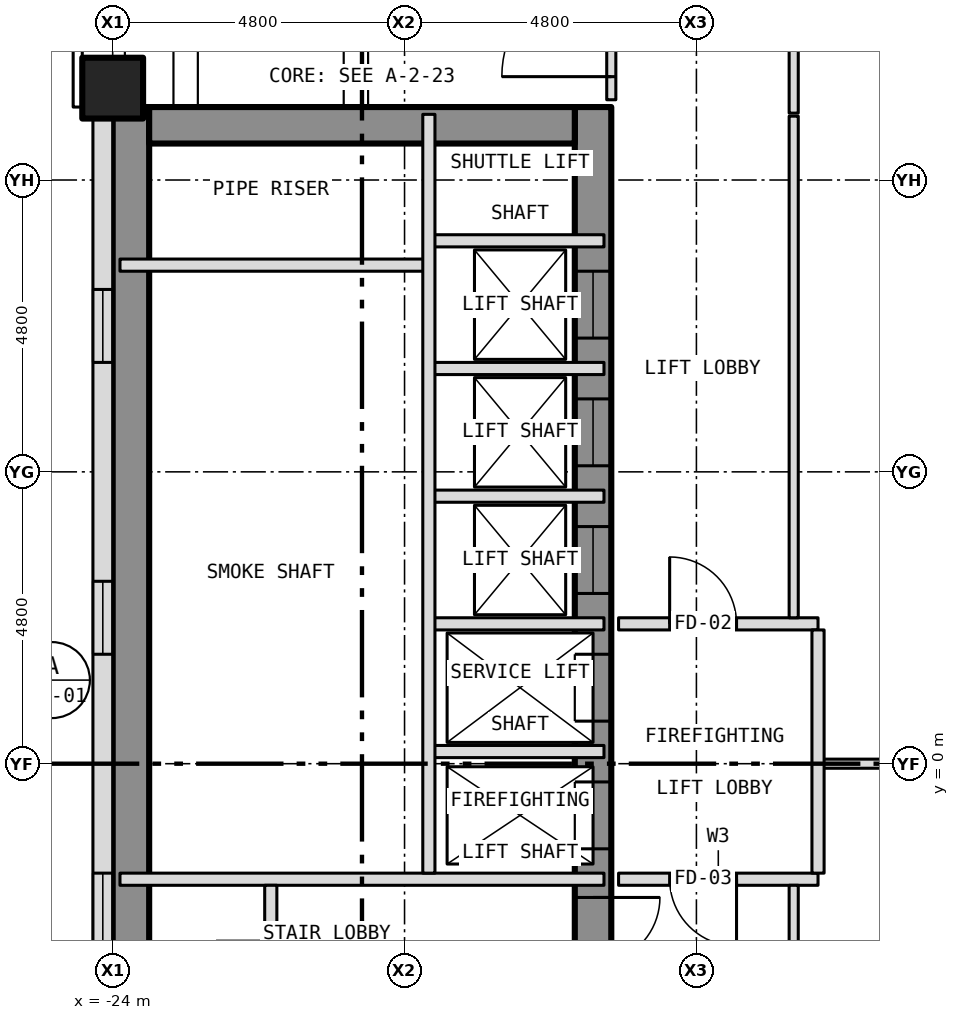
"""IFC4 building model, lengths in metres.
Left out: names, types, materials, properties, quantities, classifications, styles, units other than length and angle.
Written with IfcOpenShell. Run it as: python <this file> out.ifc"""

import sys

from ifc_helpers import new_model, si_unit, direction, frame, frame_2d, origin, origin_2d, place, context, subcontext, project, spatial, rectangle, hollow_rectangle, extrude, element, fill, save


model = new_model("IFC4")
c1 = context("Model", 3, precision=1e-05, world=origin(), true_north=direction((0.0, 1.0)))
c2 = subcontext(c1, "Body", "Model", "MODEL_VIEW")
j1 = project(units=[si_unit("LENGTHUNIT", "METRE"), si_unit("PLANEANGLEUNIT", "RADIAN")], contexts=[c1])
p1 = place(None, origin())
s1 = spatial("IfcSite", under=j1, at=p1, CompositionType="ELEMENT")
p2 = place(p1, origin())
s2 = spatial("IfcBuilding", under=s1, at=p2, CompositionType="ELEMENT")
p3 = place(p2, frame((0.0, 0.0, 84.5)))
s3 = spatial("IfcBuildingStorey", under=s2, at=p3, CompositionType="ELEMENT", Elevation=84.5)
p4 = place(p3, frame((-24.0, 11.111, -0.3), z_axis=(0.0, 0.0, 1.0), x_axis=(1.0, 0.0, 0.0)))
e1 = element("IfcColumn", 1, at=p4, inside=s3, PredefinedType="COLUMN", context=c2, shape_type="SweptSolid", body=[
    extrude(hollow_rectangle(XDim=1.0, YDim=1.0, WallThickness=0.06, at=origin_2d()), origin(), (0.0, 0.0, 1.0), 4.65),
])
p5 = place(p3, frame((-16.1, -10.8, 0.0), z_axis=(0.0, 0.0, 1.0), x_axis=(0.0, 1.0, 0.0)))
e2 = element("IfcWall", 2, at=p5, inside=s3, PredefinedType="SHEAR", context=c2, shape_type="SweptSolid", body=[
    extrude(rectangle(XDim=21.6, YDim=0.6, at=frame_2d((10.8, 0.0))), origin(), (0.0, 0.0, 1.0), 3.9),
])
p6 = place(p5, frame((9.4, 0.0, 0.0)))
e3 = element("IfcOpeningElement", 3, at=p6, cuts=e2, PredefinedType="OPENING", context=c2, shape_type="SweptSolid", body=[
    extrude(rectangle(XDim=1.1, YDim=2.1, at=frame_2d((0.55, 1.05))), frame((0.0, 0.312, 0.0), z_axis=(0.0, -1.0, 0.0), x_axis=(1.0, 0.0, 0.0)), (0.0, 0.0, 1.0), 0.624),
])
p7 = place(p5, frame((11.5, 0.0, 0.0)))
e4 = element("IfcOpeningElement", 4, at=p7, cuts=e2, PredefinedType="OPENING", context=c2, shape_type="SweptSolid", body=[
    extrude(rectangle(XDim=1.1, YDim=2.1, at=frame_2d((0.55, 1.05))), frame((0.0, 0.312, 0.0), z_axis=(0.0, -1.0, 0.0), x_axis=(1.0, 0.0, 0.0)), (0.0, 0.0, 1.0), 0.624),
])
p8 = place(p5, frame((13.6, 0.0, 0.0)))
e5 = element("IfcOpeningElement", 5, at=p8, cuts=e2, PredefinedType="OPENING", context=c2, shape_type="SweptSolid", body=[
    extrude(rectangle(XDim=1.1, YDim=2.1, at=frame_2d((0.55, 1.05))), frame((0.0, 0.312, 0.0), z_axis=(0.0, -1.0, 0.0), x_axis=(1.0, 0.0, 0.0)), (0.0, 0.0, 1.0), 0.624),
])
p9 = place(p5, frame((15.7, 0.0, 0.0)))
e6 = element("IfcOpeningElement", 6, at=p9, cuts=e2, PredefinedType="OPENING", context=c2, shape_type="SweptSolid", body=[
    extrude(rectangle(XDim=1.1, YDim=2.1, at=frame_2d((0.55, 1.05))), frame((0.0, 0.312, 0.0), z_axis=(0.0, -1.0, 0.0), x_axis=(1.0, 0.0, 0.0)), (0.0, 0.0, 1.0), 0.624),
])
p10 = place(p5, frame((17.8, 0.0, 0.0)))
e7 = element("IfcOpeningElement", 7, at=p10, cuts=e2, PredefinedType="OPENING", context=c2, shape_type="SweptSolid", body=[
    extrude(rectangle(XDim=1.1, YDim=2.1, at=frame_2d((0.55, 1.05))), frame((0.0, 0.312, 0.0), z_axis=(0.0, -1.0, 0.0), x_axis=(1.0, 0.0, 0.0)), (0.0, 0.0, 1.0), 0.624),
])
p11 = place(p5, frame((0.758, 0.0, 0.0)))
e8 = element("IfcOpeningElement", 8, at=p11, cuts=e2, PredefinedType="OPENING", context=c2, shape_type="SweptSolid", body=[
    extrude(rectangle(XDim=1.1, YDim=2.1, at=frame_2d((0.55, 1.05))), frame((0.0, 0.312, 0.0), z_axis=(0.0, -1.0, 0.0), x_axis=(1.0, 0.0, 0.0)), (0.0, 0.0, 1.0), 0.624),
])
p12 = place(p5, frame((7.5, 0.0, 0.0)))
e9 = element("IfcOpeningElement", 9, at=p12, cuts=e2, PredefinedType="OPENING", context=c2, shape_type="SweptSolid", body=[
    extrude(rectangle(XDim=1.1, YDim=2.1, at=frame_2d((0.55, 1.05))), frame((0.0, 0.312, 0.0), z_axis=(0.0, -1.0, 0.0), x_axis=(1.0, 0.0, 0.0)), (0.0, 0.0, 1.0), 0.624),
])
p13 = place(p3, frame((-23.7, -10.8, 0.0), z_axis=(0.0, 0.0, 1.0), x_axis=(0.0, 1.0, 0.0)))
e10 = element("IfcWall", 10, at=p13, inside=s3, PredefinedType="SHEAR", context=c2, shape_type="SweptSolid", body=[
    extrude(rectangle(XDim=21.6, YDim=0.6, at=frame_2d((10.8, 0.0))), origin(), (0.0, 0.0, 1.0), 3.9),
])
p14 = place(p3, frame((-23.4, 10.5, 0.0), z_axis=(0.0, 0.0, 1.0), x_axis=(1.0, 0.0, 0.0)))
e11 = element("IfcWall", 11, at=p14, inside=s3, PredefinedType="SHEAR", context=c2, shape_type="SweptSolid", body=[
    extrude(rectangle(XDim=7.0, YDim=0.6, at=frame_2d((3.5, 0.0))), origin(), (0.0, 0.0, 1.0), 3.9),
])
p15 = place(p3, frame((-24.163, 10.8, 0.0), z_axis=(0.0, 0.0, 1.0), x_axis=(0.0, -1.0, 0.0)))
e12 = element("IfcWall", 12, at=p15, inside=s3, PredefinedType="SOLIDWALL", context=c2, shape_type="SweptSolid", body=[
    extrude(rectangle(XDim=21.6, YDim=0.325, at=frame_2d((10.8, 0.0))), origin(), (0.0, 0.0, 1.0), 4.5),
])
p16 = place(p15, frame((3.0, 0.0, 2.2)))
e13 = element("IfcOpeningElement", 13, at=p16, cuts=e12, PredefinedType="OPENING", context=c2, shape_type="SweptSolid", body=[
    extrude(rectangle(XDim=1.2, YDim=0.6, at=frame_2d((0.6, 0.3))), frame((0.0, 0.175, 0.0), z_axis=(0.0, -1.0, 0.0), x_axis=(1.0, 0.0, 0.0)), (0.0, 0.0, 1.0), 0.349),
])
p17 = place(p15, frame((7.8, 0.0, 2.2)))
e14 = element("IfcOpeningElement", 14, at=p17, cuts=e12, PredefinedType="OPENING", context=c2, shape_type="SweptSolid", body=[
    extrude(rectangle(XDim=1.2, YDim=0.6, at=frame_2d((0.6, 0.3))), frame((0.0, 0.175, 0.0), z_axis=(0.0, -1.0, 0.0), x_axis=(1.0, 0.0, 0.0)), (0.0, 0.0, 1.0), 0.349),
])
p18 = place(p15, frame((12.6, 0.0, 2.2)))
e15 = element("IfcOpeningElement", 15, at=p18, cuts=e12, PredefinedType="OPENING", context=c2, shape_type="SweptSolid", body=[
    extrude(rectangle(XDim=1.2, YDim=0.6, at=frame_2d((0.6, 0.3))), frame((0.0, 0.175, 0.0), z_axis=(0.0, -1.0, 0.0), x_axis=(1.0, 0.0, 0.0)), (0.0, 0.0, 1.0), 0.349),
])
p19 = place(p15, frame((17.4, 0.0, 2.2)))
e16 = element("IfcOpeningElement", 16, at=p19, cuts=e12, PredefinedType="OPENING", context=c2, shape_type="SweptSolid", body=[
    extrude(rectangle(XDim=1.2, YDim=0.6, at=frame_2d((0.6, 0.3))), frame((0.0, 0.175, 0.0), z_axis=(0.0, -1.0, 0.0), x_axis=(1.0, 0.0, 0.0)), (0.0, 0.0, 1.0), 0.349),
])
p20 = place(p3, frame((-23.88, -1.9, 0.0), z_axis=(0.0, 0.0, 1.0), x_axis=(1.0, 0.0, 0.0)))
e17 = element("IfcWall", 17, at=p20, inside=s3, PredefinedType="PARTITIONING", context=c2, shape_type="SweptSolid", body=[
    extrude(rectangle(XDim=7.96, YDim=0.2, at=frame_2d((3.98, 0.0))), origin(), (0.0, 0.0, 1.0), 3.9),
])
p21 = place(p3, frame((-15.68, -1.9, 0.0), z_axis=(0.0, 0.0, 1.0), x_axis=(1.0, 0.0, 0.0)))
e18 = element("IfcWall", 18, at=p21, inside=s3, PredefinedType="PARTITIONING", context=c2, shape_type="SweptSolid", body=[
    extrude(rectangle(XDim=3.28, YDim=0.2, at=frame_2d((1.64, 0.0))), origin(), (0.0, 0.0, 1.0), 4.35),
])
p22 = place(p21, frame((0.84, 0.0, 0.0)))
e19 = element("IfcOpeningElement", 19, at=p22, cuts=e18, PredefinedType="OPENING", context=c2, shape_type="SweptSolid", body=[
    extrude(rectangle(XDim=1.1, YDim=2.1, at=frame_2d((0.55, 1.05))), frame((0.0, 0.112, 0.0), z_axis=(0.0, -1.0, 0.0), x_axis=(1.0, 0.0, 0.0)), (0.0, 0.0, 1.0), 0.224),
])
p23 = place(p3, frame((-12.4, 0.0, 0.0), z_axis=(0.0, 0.0, 1.0), x_axis=(1.0, 0.0, 0.0)))
e20 = element("IfcWall", 20, at=p23, inside=s3, PredefinedType="PARTITIONING", context=c2, shape_type="SweptSolid", body=[
    extrude(rectangle(XDim=2.596, YDim=0.15, at=frame_2d((1.298, 0.0))), origin(), (0.0, 0.0, 1.0), 3.728),
])
for number, where, z_axis, x_axis in (
    (21, (-18.8, 0.2, 0.0), (0.0, 0.0, 1.0), (1.0, 0.0, 0.0)),
    (22, (-18.8, 2.3, 0.0), (0.0, 0.0, 1.0), (1.0, 0.0, 0.0)),
):
    element("IfcWall", number, at=place(p3, frame(where, z_axis=z_axis, x_axis=x_axis)), inside=s3, PredefinedType="PARTITIONING", context=c2, shape_type="SweptSolid", body=[
        extrude(rectangle(XDim=2.88, YDim=0.2, at=frame_2d((1.44, 0.0))), origin(), (0.0, 0.0, 1.0), 3.9),
    ])
p24 = place(p3, frame((-15.68, 2.3, 0.0), z_axis=(0.0, 0.0, 1.0), x_axis=(1.0, 0.0, 0.0)))
e23 = element("IfcWall", 23, at=p24, inside=s3, PredefinedType="PARTITIONING", context=c2, shape_type="SweptSolid", body=[
    extrude(rectangle(XDim=3.28, YDim=0.2, at=frame_2d((1.64, 0.0))), origin(), (0.0, 0.0, 1.0), 4.35),
])
p25 = place(p24, frame((0.84, 0.0, 0.0)))
e24 = element("IfcOpeningElement", 24, at=p25, cuts=e23, PredefinedType="OPENING", context=c2, shape_type="SweptSolid", body=[
    extrude(rectangle(XDim=1.1, YDim=2.1, at=frame_2d((0.55, 1.05))), frame((0.0, 0.112, 0.0), z_axis=(0.0, -1.0, 0.0), x_axis=(1.0, 0.0, 0.0)), (0.0, 0.0, 1.0), 0.224),
])
for number, where, z_axis, x_axis in (
    (25, (-18.8, 4.4, 0.0), (0.0, 0.0, 1.0), (1.0, 0.0, 0.0)),
    (26, (-18.8, 6.5, 0.0), (0.0, 0.0, 1.0), (1.0, 0.0, 0.0)),
):
    element("IfcWall", number, at=place(p3, frame(where, z_axis=z_axis, x_axis=x_axis)), inside=s3, PredefinedType="PARTITIONING", context=c2, shape_type="SweptSolid", body=[
        extrude(rectangle(XDim=2.88, YDim=0.2, at=frame_2d((1.44, 0.0))), origin(), (0.0, 0.0, 1.0), 3.9),
    ])
p26 = place(p3, frame((-23.88, 8.2, 0.0), z_axis=(0.0, 0.0, 1.0), x_axis=(1.0, 0.0, 0.0)))
e27 = element("IfcWall", 27, at=p26, inside=s3, PredefinedType="PARTITIONING", context=c2, shape_type="SweptSolid", body=[
    extrude(rectangle(XDim=5.08, YDim=0.2, at=frame_2d((2.54, 0.0))), origin(), (0.0, 0.0, 1.0), 3.9),
])
p27 = place(p3, frame((-18.8, 8.6, 0.0), z_axis=(0.0, 0.0, 1.0), x_axis=(1.0, 0.0, 0.0)))
e28 = element("IfcWall", 28, at=p27, inside=s3, PredefinedType="PARTITIONING", context=c2, shape_type="SweptSolid", body=[
    extrude(rectangle(XDim=2.88, YDim=0.2, at=frame_2d((1.44, 0.0))), origin(), (0.0, 0.0, 1.0), 3.9),
])
p28 = place(p3, frame((-21.4, -10.68, 0.0), z_axis=(0.0, 0.0, 1.0), x_axis=(0.0, 1.0, 0.0)))
e29 = element("IfcWall", 29, at=p28, inside=s3, PredefinedType="PARTITIONING", context=c2, shape_type="SweptSolid", body=[
    extrude(rectangle(XDim=8.68, YDim=0.2, at=frame_2d((4.34, 0.0))), origin(), (0.0, 0.0, 1.0), 3.9),
])
p29 = place(p28, frame((1.655, 0.0, 0.0)))
e30 = element("IfcOpeningElement", 30, at=p29, cuts=e29, PredefinedType="OPENING", context=c2, shape_type="SweptSolid", body=[
    extrude(rectangle(XDim=0.9, YDim=2.1, at=frame_2d((0.45, 1.05))), frame((0.0, 0.112, 0.0), z_axis=(0.0, -1.0, 0.0), x_axis=(1.0, 0.0, 0.0)), (0.0, 0.0, 1.0), 0.224),
])
p30 = place(p28, frame((4.637, 0.0, 0.0)))
e31 = element("IfcOpeningElement", 31, at=p30, cuts=e29, PredefinedType="OPENING", context=c2, shape_type="SweptSolid", body=[
    extrude(rectangle(XDim=0.9, YDim=2.1, at=frame_2d((0.45, 1.05))), frame((0.0, 0.112, 0.0), z_axis=(0.0, -1.0, 0.0), x_axis=(1.0, 0.0, 0.0)), (0.0, 0.0, 1.0), 0.224),
])
p31 = place(p28, frame((6.862, 0.0, 0.0)))
e32 = element("IfcOpeningElement", 32, at=p31, cuts=e29, PredefinedType="OPENING", context=c2, shape_type="SweptSolid", body=[
    extrude(rectangle(XDim=0.9, YDim=2.1, at=frame_2d((0.45, 1.05))), frame((0.0, 0.112, 0.0), z_axis=(0.0, -1.0, 0.0), x_axis=(1.0, 0.0, 0.0)), (0.0, 0.0, 1.0), 0.224),
])
p32 = place(p3, frame((-18.8, -1.8, 0.0), z_axis=(0.0, 0.0, 1.0), x_axis=(0.0, 1.0, 0.0)))
e33 = element("IfcWall", 33, at=p32, inside=s3, PredefinedType="PARTITIONING", context=c2, shape_type="SweptSolid", body=[
    extrude(rectangle(XDim=12.48, YDim=0.2, at=frame_2d((6.24, 0.0))), origin(), (0.0, 0.0, 1.0), 3.9),
])
p33 = place(p3, frame((-15.8, 10.92, 0.0), z_axis=(0.0, 0.0, 1.0), x_axis=(0.0, 1.0, 0.0)))
e34 = element("IfcWall", 34, at=p33, inside=s3, PredefinedType="PARTITIONING", context=c2, shape_type="SweptSolid", body=[
    extrude(rectangle(XDim=4.805, YDim=0.15, at=frame_2d((2.403, 0.0))), origin(), (0.0, 0.0, 1.0), 4.35),
])
p34 = place(p33, frame((0.38, 0.0, 0.0)))
e35 = element("IfcOpeningElement", 35, at=p34, cuts=e34, PredefinedType="OPENING", context=c2, shape_type="SweptSolid", body=[
    extrude(rectangle(XDim=1.8, YDim=2.1, at=frame_2d((0.9, 1.05))), frame((0.0, 0.087, 0.0), z_axis=(0.0, -1.0, 0.0), x_axis=(1.0, 0.0, 0.0)), (0.0, 0.0, 1.0), 0.174),
])
p35 = place(p3, frame((-12.8, -13.525, 0.0), z_axis=(0.0, 0.0, 1.0), x_axis=(0.0, 1.0, 0.0)))
e36 = element("IfcWall", 36, at=p35, inside=s3, PredefinedType="PARTITIONING", context=c2, shape_type="SweptSolid", body=[
    extrude(rectangle(XDim=11.525, YDim=0.15, at=frame_2d((5.762, 0.0))), origin(), (0.0, 0.0, 1.0), 4.35),
])
p36 = place(p3, frame((-12.8, 2.4, 0.0), z_axis=(0.0, 0.0, 1.0), x_axis=(0.0, 1.0, 0.0)))
e37 = element("IfcWall", 37, at=p36, inside=s3, PredefinedType="PARTITIONING", context=c2, shape_type="SweptSolid", body=[
    extrude(rectangle(XDim=8.25, YDim=0.15, at=frame_2d((4.125, 0.0))), origin(), (0.0, 0.0, 1.0), 4.35),
])
p37 = place(p3, frame((-12.8, 10.7, 0.0), z_axis=(0.0, 0.0, 1.0), x_axis=(0.0, 1.0, 0.0)))
e38 = element("IfcWall", 38, at=p37, inside=s3, PredefinedType="PARTITIONING", context=c2, shape_type="SweptSolid", body=[
    extrude(rectangle(XDim=2.825, YDim=0.15, at=frame_2d((1.413, 0.0))), origin(), (0.0, 0.0, 1.0), 4.35),
])
p38 = place(p3, frame((-12.4, -1.8, 0.0), z_axis=(0.0, 0.0, 1.0), x_axis=(0.0, 1.0, 0.0)))
e39 = element("IfcWall", 39, at=p38, inside=s3, PredefinedType="PARTITIONING", context=c2, shape_type="SweptSolid", body=[
    extrude(rectangle(XDim=4.0, YDim=0.2, at=frame_2d((2.0, 0.0))), origin(), (0.0, 0.0, 1.0), 4.35),
])
p39 = place(p16, origin())
e40 = element("IfcWindow", 40, at=p39, inside=s3, PartitioningType="SINGLE_PANEL", PredefinedType="WINDOW", context=c2, shape_type="SweptSolid", body=[
    extrude(rectangle(XDim=1.2, YDim=0.6, at=frame_2d((0.6, 0.3))), frame((0.0, -0.073, 0.0), z_axis=(0.0, -1.0, 0.0), x_axis=(1.0, 0.0, 0.0)), (0.0, 0.0, 1.0), 0.06),
])
fill(e13, e40)
p40 = place(p17, origin())
e41 = element("IfcWindow", 41, at=p40, inside=s3, PartitioningType="SINGLE_PANEL", PredefinedType="WINDOW", context=c2, shape_type="SweptSolid", body=[
    extrude(rectangle(XDim=1.2, YDim=0.6, at=frame_2d((0.6, 0.3))), frame((0.0, -0.073, 0.0), z_axis=(0.0, -1.0, 0.0), x_axis=(1.0, 0.0, 0.0)), (0.0, 0.0, 1.0), 0.06),
])
fill(e14, e41)
p41 = place(p18, origin())
e42 = element("IfcWindow", 42, at=p41, inside=s3, PartitioningType="SINGLE_PANEL", PredefinedType="WINDOW", context=c2, shape_type="SweptSolid", body=[
    extrude(rectangle(XDim=1.2, YDim=0.6, at=frame_2d((0.6, 0.3))), frame((0.0, -0.073, 0.0), z_axis=(0.0, -1.0, 0.0), x_axis=(1.0, 0.0, 0.0)), (0.0, 0.0, 1.0), 0.06),
])
fill(e15, e42)
p42 = place(p6, origin())
e43 = element("IfcDoor", 43, at=p42, inside=s3, OperationType="SLIDING_TO_LEFT", PredefinedType="DOOR", context=c2, shape_type="SweptSolid", body=[
    extrude(rectangle(XDim=1.1, YDim=2.1, at=frame_2d((0.55, 1.05))), frame((0.0, 0.025, 0.0), z_axis=(0.0, -1.0, 0.0), x_axis=(1.0, 0.0, 0.0)), (0.0, 0.0, 1.0), 0.05),
])
fill(e3, e43)
p43 = place(p7, origin())
e44 = element("IfcDoor", 44, at=p43, inside=s3, OperationType="SLIDING_TO_LEFT", PredefinedType="DOOR", context=c2, shape_type="SweptSolid", body=[
    extrude(rectangle(XDim=1.1, YDim=2.1, at=frame_2d((0.55, 1.05))), frame((0.0, 0.025, 0.0), z_axis=(0.0, -1.0, 0.0), x_axis=(1.0, 0.0, 0.0)), (0.0, 0.0, 1.0), 0.05),
])
fill(e4, e44)
p44 = place(p8, origin())
e45 = element("IfcDoor", 45, at=p44, inside=s3, OperationType="SLIDING_TO_LEFT", PredefinedType="DOOR", context=c2, shape_type="SweptSolid", body=[
    extrude(rectangle(XDim=1.1, YDim=2.1, at=frame_2d((0.55, 1.05))), frame((0.0, 0.025, 0.0), z_axis=(0.0, -1.0, 0.0), x_axis=(1.0, 0.0, 0.0)), (0.0, 0.0, 1.0), 0.05),
])
fill(e5, e45)
p45 = place(p9, origin())
e46 = element("IfcDoor", 46, at=p45, inside=s3, OperationType="SLIDING_TO_LEFT", PredefinedType="DOOR", context=c2, shape_type="SweptSolid", body=[
    extrude(rectangle(XDim=1.1, YDim=2.1, at=frame_2d((0.55, 1.05))), frame((0.0, 0.025, 0.0), z_axis=(0.0, -1.0, 0.0), x_axis=(1.0, 0.0, 0.0)), (0.0, 0.0, 1.0), 0.05),
])
fill(e6, e46)
p46 = place(p10, origin())
e47 = element("IfcDoor", 47, at=p46, inside=s3, OperationType="SLIDING_TO_LEFT", PredefinedType="DOOR", context=c2, shape_type="SweptSolid", body=[
    extrude(rectangle(XDim=1.1, YDim=2.1, at=frame_2d((0.55, 1.05))), frame((0.0, 0.025, 0.0), z_axis=(0.0, -1.0, 0.0), x_axis=(1.0, 0.0, 0.0)), (0.0, 0.0, 1.0), 0.05),
])
fill(e7, e47)
p47 = place(p12, origin())
e48 = element("IfcDoor", 48, at=p47, inside=s3, OperationType="SINGLE_SWING_RIGHT", PredefinedType="DOOR", context=c2, shape_type="SweptSolid", body=[
    extrude(rectangle(XDim=1.1, YDim=2.1, at=frame_2d((0.55, 1.05))), frame((0.0, 0.025, 0.0), z_axis=(0.0, -1.0, 0.0), x_axis=(1.0, 0.0, 0.0)), (0.0, 0.0, 1.0), 0.05),
])
fill(e9, e48)
p48 = place(p25, origin())
e49 = element("IfcDoor", 49, at=p48, inside=s3, OperationType="SINGLE_SWING_LEFT", PredefinedType="DOOR", context=c2, shape_type="SweptSolid", body=[
    extrude(rectangle(XDim=1.1, YDim=2.1, at=frame_2d((0.55, 1.05))), frame((0.0, 0.025, 0.0), z_axis=(0.0, -1.0, 0.0), x_axis=(1.0, 0.0, 0.0)), (0.0, 0.0, 1.0), 0.05),
])
fill(e24, e49)
p49 = place(p22, origin())
e50 = element("IfcDoor", 50, at=p49, inside=s3, OperationType="SINGLE_SWING_RIGHT", PredefinedType="DOOR", context=c2, shape_type="SweptSolid", body=[
    extrude(rectangle(XDim=1.1, YDim=2.1, at=frame_2d((0.55, 1.05))), frame((0.0, 0.025, 0.0), z_axis=(0.0, -1.0, 0.0), x_axis=(1.0, 0.0, 0.0)), (0.0, 0.0, 1.0), 0.05),
])
fill(e19, e50)
p50 = place(p34, origin())
e51 = element("IfcDoor", 51, at=p50, inside=s3, OperationType="DOUBLE_DOOR_SINGLE_SWING", PredefinedType="DOOR", context=c2, shape_type="SweptSolid", body=[
    extrude(rectangle(XDim=1.8, YDim=2.1, at=frame_2d((0.9, 1.05))), frame((0.0, 0.025, 0.0), z_axis=(0.0, -1.0, 0.0), x_axis=(1.0, 0.0, 0.0)), (0.0, 0.0, 1.0), 0.05),
])
fill(e35, e51)
save(model, sys.argv[1])
